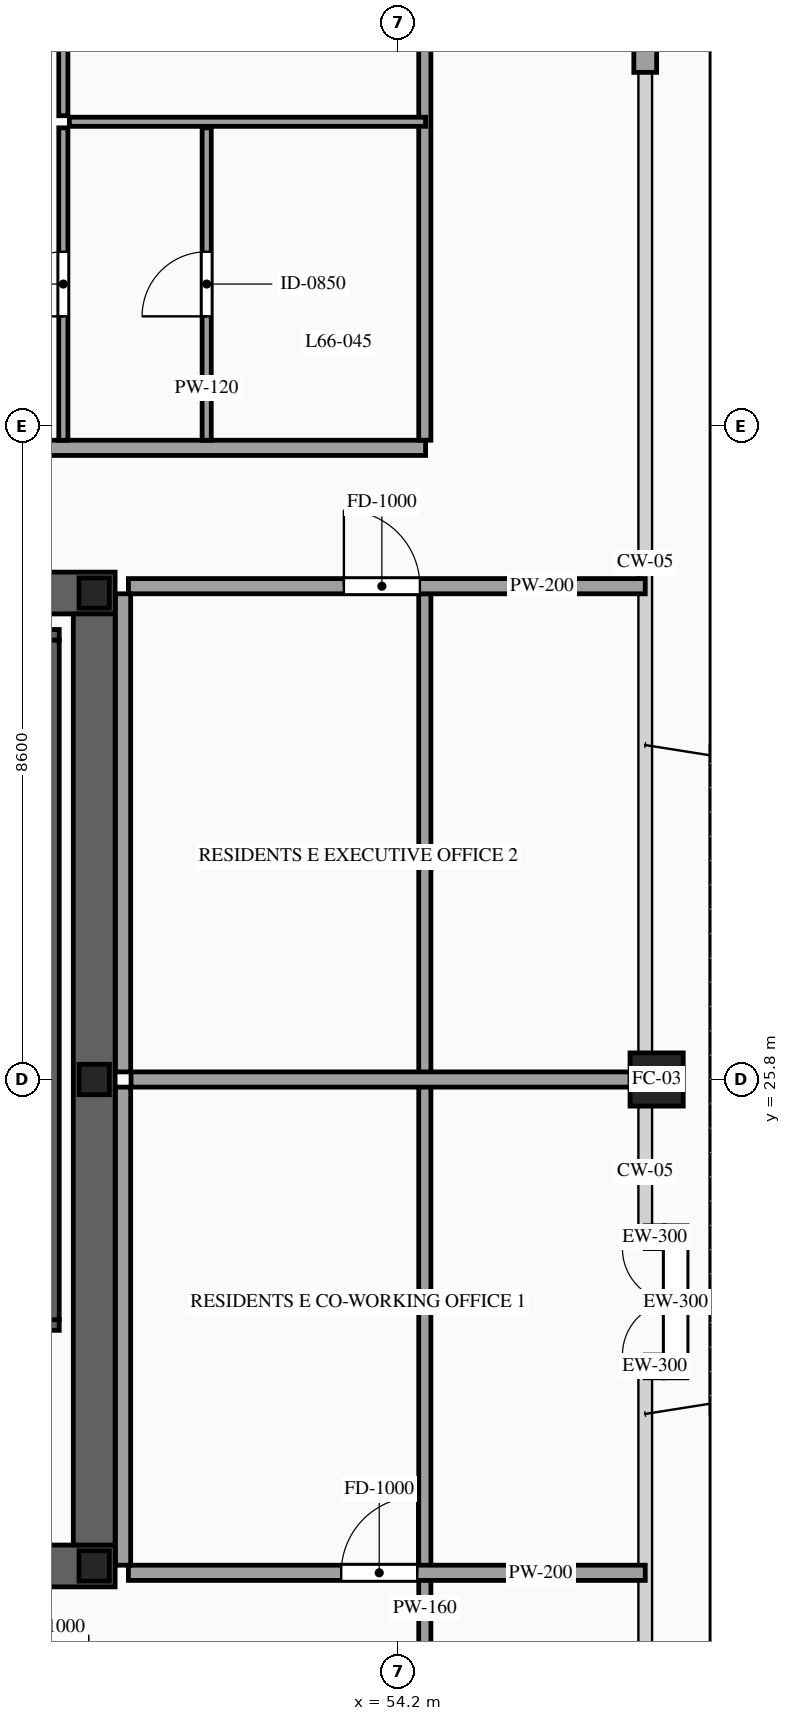
"""IFC4 building model, lengths in metres.
Left out: names, types, materials, properties, quantities, classifications, styles, units other than length and angle.
Written with IfcOpenShell. Run it as: python <this file> out.ifc"""

import sys

from ifc_helpers import new_model, si_unit, direction, frame, frame_2d, origin, origin_2d, place, context, subcontext, project, spatial, rectangle, hollow_rectangle, i_section, extrude, source, transform, mapped, element, fill, save


model = new_model("IFC4")
c1 = context("Model", 3, precision=1e-05, world=origin(), true_north=direction((0.0, 1.0)))
c2 = subcontext(c1, "Body", "Model", "MODEL_VIEW")
j1 = project(units=[si_unit("LENGTHUNIT", "METRE"), si_unit("PLANEANGLEUNIT", "RADIAN")], contexts=[c1])
p1 = place(None, origin())
s1 = spatial("IfcSite", under=j1, at=p1, CompositionType="ELEMENT")
p2 = place(p1, origin())
s2 = spatial("IfcBuilding", under=s1, at=p2, CompositionType="ELEMENT")
p3 = place(p2, frame((0.0, 0.0, 248.6)))
s3 = spatial("IfcBuildingStorey", under=s2, at=p3, CompositionType="ELEMENT", Elevation=248.6)
p4 = place(p3, frame((23.525, 19.4, 0.0), z_axis=(0.0, 0.0, 1.0), x_axis=(1.0, 0.0, 0.0)))
e1 = element("IfcWall", 1, at=p4, inside=s3, PredefinedType="SHEAR", context=c2, shape_type="SweptSolid", body=[
    extrude(rectangle(XDim=26.95, YDim=0.55, at=frame_2d((13.475, 0.0))), origin(), (0.0, 0.0, 1.0), 3.5),
])
p5 = place(p4, frame((1.925, 0.0, 0.0)))
e2 = element("IfcOpeningElement", 2, at=p5, cuts=e1, PredefinedType="OPENING", context=c2, shape_type="SweptSolid", body=[
    extrude(rectangle(XDim=1.1, YDim=2.2, at=frame_2d((0.55, 1.1))), frame((0.0, 0.29, 0.0), z_axis=(0.0, -1.0, 0.0), x_axis=(1.0, 0.0, 0.0)), (0.0, 0.0, 1.0), 0.58),
])
p6 = place(p4, frame((9.825, 0.0, 0.0)))
e3 = element("IfcOpeningElement", 3, at=p6, cuts=e1, PredefinedType="OPENING", context=c2, shape_type="SweptSolid", body=[
    extrude(rectangle(XDim=1.1, YDim=2.2, at=frame_2d((0.55, 1.1))), frame((0.0, 0.29, 0.0), z_axis=(0.0, -1.0, 0.0), x_axis=(1.0, 0.0, 0.0)), (0.0, 0.0, 1.0), 0.58),
])
p7 = place(p4, frame((23.025, 0.0, 0.0)))
e4 = element("IfcOpeningElement", 4, at=p7, cuts=e1, PredefinedType="OPENING", context=c2, shape_type="SweptSolid", body=[
    extrude(rectangle(XDim=1.1, YDim=2.2, at=frame_2d((0.55, 1.1))), frame((0.0, 0.29, 0.0), z_axis=(0.0, -1.0, 0.0), x_axis=(1.0, 0.0, 0.0)), (0.0, 0.0, 1.0), 0.58),
])
p8 = place(p4, frame((19.645, 0.0, 0.0)))
e5 = element("IfcOpeningElement", 5, at=p8, cuts=e1, PredefinedType="OPENING", context=c2, shape_type="SweptSolid", body=[
    extrude(rectangle(XDim=0.9, YDim=2.15, at=frame_2d((0.45, 1.075))), frame((0.0, 0.29, 0.0), z_axis=(0.0, -1.0, 0.0), x_axis=(1.0, 0.0, 0.0)), (0.0, 0.0, 1.0), 0.58),
])
p9 = place(p4, frame((18.205, 0.0, 0.0)))
e6 = element("IfcOpeningElement", 6, at=p9, cuts=e1, PredefinedType="OPENING", context=c2, shape_type="SweptSolid", body=[
    extrude(rectangle(XDim=0.9, YDim=2.15, at=frame_2d((0.45, 1.075))), frame((0.0, 0.29, 0.0), z_axis=(0.0, -1.0, 0.0), x_axis=(1.0, 0.0, 0.0)), (0.0, 0.0, 1.0), 0.58),
])
p10 = place(p3, frame((23.525, 32.2, 0.0), z_axis=(0.0, 0.0, 1.0), x_axis=(1.0, 0.0, 0.0)))
e7 = element("IfcWall", 7, at=p10, inside=s3, PredefinedType="SHEAR", context=c2, shape_type="SweptSolid", body=[
    extrude(rectangle(XDim=26.95, YDim=0.55, at=frame_2d((13.475, 0.0))), origin(), (0.0, 0.0, 1.0), 3.5),
])
p11 = place(p10, frame((4.545, 0.0, 0.0)))
e8 = element("IfcOpeningElement", 8, at=p11, cuts=e7, PredefinedType="OPENING", context=c2, shape_type="SweptSolid", body=[
    extrude(rectangle(XDim=0.9, YDim=2.15, at=frame_2d((0.45, 1.075))), frame((0.0, 0.29, 0.0), z_axis=(0.0, -1.0, 0.0), x_axis=(1.0, 0.0, 0.0)), (0.0, 0.0, 1.0), 0.58),
])
p12 = place(p10, frame((9.825, 0.0, 0.0)))
e9 = element("IfcOpeningElement", 9, at=p12, cuts=e7, PredefinedType="OPENING", context=c2, shape_type="SweptSolid", body=[
    extrude(rectangle(XDim=1.1, YDim=2.2, at=frame_2d((0.55, 1.1))), frame((0.0, 0.29, 0.0), z_axis=(0.0, -1.0, 0.0), x_axis=(1.0, 0.0, 0.0)), (0.0, 0.0, 1.0), 0.58),
])
p13 = place(p10, frame((15.675, 0.0, 0.0)))
e10 = element("IfcOpeningElement", 10, at=p13, cuts=e7, PredefinedType="OPENING", context=c2, shape_type="SweptSolid", body=[
    extrude(rectangle(XDim=1.1, YDim=2.2, at=frame_2d((0.55, 1.1))), frame((0.0, 0.29, 0.0), z_axis=(0.0, -1.0, 0.0), x_axis=(1.0, 0.0, 0.0)), (0.0, 0.0, 1.0), 0.58),
])
m1 = source(origin(), c2, "Body", "SweptSolid", [
    extrude(rectangle(XDim=12.25, YDim=0.55, at=frame_2d((6.125, 0.0))), origin(), (0.0, 0.0, 1.0), 3.5),
])
p14 = place(p3, frame((50.2, 19.675, 0.0), z_axis=(0.0, 0.0, 1.0), x_axis=(0.0, 1.0, 0.0)))
e11 = element("IfcWall", 11, at=p14, inside=s3, PredefinedType="SHEAR", context=c2, shape_type="MappedRepresentation", body=[
    mapped(m1, transform((0.0, 0.0, 0.0), scale=1.0)),
])
m2 = source(origin(), c2, "Body", "SweptSolid", [
    extrude(i_section(OverallWidth=0.4, OverallDepth=0.4, WebThickness=0.013, FlangeThickness=0.021, at=origin_2d()), origin(), (0.0, 0.0, 1.0), 3.5),
])
for number, where, z_axis, x_axis in (
    (12, (50.2, 19.4, 0.0), (0.0, 0.0, 1.0), (1.0, 0.0, 0.0)),
    (13, (50.2, 25.8, 0.0), (0.0, 0.0, 1.0), (1.0, 0.0, 0.0)),
    (14, (50.2, 32.2, 0.0), (0.0, 0.0, 1.0), (1.0, 0.0, 0.0)),
):
    element("IfcColumn", number, at=place(p3, frame(where, z_axis=z_axis, x_axis=x_axis)), inside=s3, PredefinedType="COLUMN", context=c2, shape_type="MappedRepresentation", body=[
        mapped(m2, transform((0.0, 0.0, 0.0), scale=1.0)),
    ])
m3 = source(origin(), c2, "Body", "SweptSolid", [
    extrude(hollow_rectangle(XDim=0.7, YDim=0.7, WallThickness=0.032, at=origin_2d()), origin(), (0.0, 0.0, 1.0), 3.5),
])
p15 = place(p3, frame((57.6, 25.8, 0.0), z_axis=(0.0, 0.0, 1.0), x_axis=(1.0, 0.0, 0.0)))
e15 = element("IfcColumn", 15, at=p15, inside=s3, PredefinedType="COLUMN", context=c2, shape_type="MappedRepresentation", body=[
    mapped(m3, transform((0.0, 0.0, 0.0), scale=1.0)),
])
m4 = source(origin(), c2, "Body", "SweptSolid", [
    extrude(rectangle(XDim=3.15, YDim=0.3, at=frame_2d((1.575, 0.0))), origin(), (0.0, 0.0, 1.0), 2.835),
])
p16 = place(p3, frame((57.45, 39.05, 0.0), z_axis=(0.0, 0.0, 1.0), x_axis=(0.0, 1.0, 0.0)))
e16 = element("IfcWall", 16, at=p16, inside=s3, PredefinedType="SOLIDWALL", context=c2, shape_type="MappedRepresentation", body=[
    mapped(m4, transform((0.0, 0.0, 0.0), scale=1.0)),
])
p17 = place(p3, frame((57.85, 21.875, 0.0), z_axis=(0.0, 0.0, 1.0), x_axis=(0.0, 1.0, 0.0)))
e17 = element("IfcWall", 17, at=p17, inside=s3, PredefinedType="SOLIDWALL", context=c2, shape_type="SweptSolid", body=[
    extrude(rectangle(XDim=2.0, YDim=0.3, at=frame_2d((1.0, 0.0))), origin(), (0.0, 0.0, 1.0), 2.835),
])
p18 = place(p17, frame((0.3, 0.0, 0.0)))
e18 = element("IfcOpeningElement", 18, at=p18, cuts=e17, PredefinedType="OPENING", context=c2, shape_type="SweptSolid", body=[
    extrude(rectangle(XDim=1.4, YDim=2.3, at=frame_2d((0.7, 1.15))), frame((0.0, 0.165, 0.0), z_axis=(0.0, -1.0, 0.0), x_axis=(1.0, 0.0, 0.0)), (0.0, 0.0, 1.0), 0.33),
])
m5 = source(origin(), c2, "Body", "SweptSolid", [
    extrude(rectangle(XDim=0.25, YDim=0.3, at=frame_2d((0.125, 0.0))), origin(), (0.0, 0.0, 1.0), 3.28),
])
for number, where, z_axis, x_axis in (
    (19, (57.45, 22.025, 0.0), (0.0, 0.0, 1.0), (1.0, 0.0, 0.0)),
    (20, (57.7, 23.725, 0.0), (0.0, 0.0, 1.0), (-1.0, 0.0, 0.0)),
):
    element("IfcWall", number, at=place(p3, frame(where, z_axis=z_axis, x_axis=x_axis)), inside=s3, PredefinedType="SOLIDWALL", context=c2, shape_type="MappedRepresentation", body=[
        mapped(m5, transform((0.0, 0.0, 0.0), scale=1.0)),
    ])
p19 = place(p3, frame((46.46, 22.57, 0.0), z_axis=(0.0, 0.0, 1.0), x_axis=(1.0, 0.0, 0.0)))
e21 = element("IfcWall", 21, at=p19, inside=s3, PredefinedType="SOLIDWALL", context=c2, shape_type="SweptSolid", body=[
    extrude(rectangle(XDim=3.28, YDim=0.14, at=frame_2d((1.64, 0.0))), origin(), (0.0, 0.0, 1.0), 3.28),
])
p20 = place(p19, frame((1.09, 0.0, 0.0)))
e22 = element("IfcOpeningElement", 22, at=p20, cuts=e21, PredefinedType="OPENING", context=c2, shape_type="SweptSolid", body=[
    extrude(rectangle(XDim=1.1, YDim=2.2, at=frame_2d((0.55, 1.1))), frame((0.0, 0.085, 0.0), z_axis=(0.0, -1.0, 0.0), x_axis=(1.0, 0.0, 0.0)), (0.0, 0.0, 1.0), 0.17),
])
m6 = source(origin(), c2, "Body", "SweptSolid", [
    extrude(rectangle(XDim=3.28, YDim=0.14, at=frame_2d((1.64, 0.0))), origin(), (0.0, 0.0, 1.0), 3.28),
])
p21 = place(p3, frame((46.46, 31.65, 0.0), z_axis=(0.0, 0.0, 1.0), x_axis=(1.0, 0.0, 0.0)))
e23 = element("IfcWall", 23, at=p21, inside=s3, PredefinedType="SOLIDWALL", context=c2, shape_type="MappedRepresentation", body=[
    mapped(m6, transform((0.0, 0.0, 0.0), scale=1.0)),
])
m7 = source(origin(), c2, "Body", "SweptSolid", [
    extrude(rectangle(XDim=8.94, YDim=0.14, at=frame_2d((4.47, 0.0))), origin(), (0.0, 0.0, 1.0), 3.28),
])
p22 = place(p3, frame((49.67, 22.64, 0.0), z_axis=(0.0, 0.0, 1.0), x_axis=(0.0, 1.0, 0.0)))
e24 = element("IfcWall", 24, at=p22, inside=s3, PredefinedType="SOLIDWALL", context=c2, shape_type="MappedRepresentation", body=[
    mapped(m7, transform((0.0, 0.0, 0.0), scale=1.0)),
])
p23 = place(p3, frame((43.402, 34.11, 0.0), z_axis=(0.0, 0.0, 1.0), x_axis=(1.0, 0.0, 0.0)))
e25 = element("IfcWall", 25, at=p23, inside=s3, PredefinedType="PARTITIONING", context=c2, shape_type="SweptSolid", body=[
    extrude(rectangle(XDim=11.158, YDim=0.2, at=frame_2d((5.579, 0.0))), origin(), (0.0, 0.0, 1.0), 3.28),
])
p24 = place(p23, frame((4.409, 0.0, 0.0)))
e26 = element("IfcOpeningElement", 26, at=p24, cuts=e25, PredefinedType="OPENING", context=c2, shape_type="SweptSolid", body=[
    extrude(rectangle(XDim=1.0, YDim=2.2, at=frame_2d((0.5, 1.1))), frame((0.0, 0.115, 0.0), z_axis=(0.0, -1.0, 0.0), x_axis=(1.0, 0.0, 0.0)), (0.0, 0.0, 1.0), 0.23),
])
m8 = source(origin(), c2, "Body", "SweptSolid", [
    extrude(rectangle(XDim=11.89, YDim=0.16, at=frame_2d((5.945, 0.0))), origin(), (0.0, 0.0, 1.0), 3.28),
])
p25 = place(p3, frame((54.55, 34.21, 0.0), z_axis=(0.0, 0.0, 1.0), x_axis=(0.0, 1.0, 0.0)))
e27 = element("IfcWall", 27, at=p25, inside=s3, PredefinedType="PARTITIONING", context=c2, shape_type="MappedRepresentation", body=[
    mapped(m8, transform((0.0, 0.0, 0.0), scale=1.0)),
])
p26 = place(p3, frame((51.68, 34.21, 0.0), z_axis=(0.0, 0.0, 1.0), x_axis=(0.0, 1.0, 0.0)))
e28 = element("IfcWall", 28, at=p26, inside=s3, PredefinedType="PARTITIONING", context=c2, shape_type="SweptSolid", body=[
    extrude(rectangle(XDim=4.11, YDim=0.12, at=frame_2d((2.055, 0.0))), origin(), (0.0, 0.0, 1.0), 3.28),
])
p27 = place(p26, frame((1.63, 0.0, 0.0)))
e29 = element("IfcOpeningElement", 29, at=p27, cuts=e28, PredefinedType="OPENING", context=c2, shape_type="SweptSolid", body=[
    extrude(rectangle(XDim=0.85, YDim=2.1, at=frame_2d((0.425, 1.05))), frame((0.0, 0.075, 0.0), z_axis=(0.0, -1.0, 0.0), x_axis=(1.0, 0.0, 0.0)), (0.0, 0.0, 1.0), 0.15),
])
m9 = source(origin(), c2, "Body", "SweptSolid", [
    extrude(rectangle(XDim=4.686, YDim=0.12, at=frame_2d((2.343, 0.0))), origin(), (0.0, 0.0, 1.0), 3.28),
])
p28 = place(p3, frame((49.874, 38.4, 0.0), z_axis=(0.0, 0.0, 1.0), x_axis=(1.0, 0.0, 0.0)))
e30 = element("IfcWall", 30, at=p28, inside=s3, PredefinedType="PARTITIONING", context=c2, shape_type="MappedRepresentation", body=[
    mapped(m9, transform((0.0, 0.0, 0.0), scale=1.0)),
])
p29 = place(p3, frame((49.794, 38.48, 0.0), z_axis=(0.0, 0.0, 1.0), x_axis=(0.0, 1.0, 0.0)))
e31 = element("IfcWall", 31, at=p29, inside=s3, PredefinedType="PARTITIONING", context=c2, shape_type="SweptSolid", body=[
    extrude(rectangle(XDim=7.77, YDim=0.12, at=frame_2d((3.885, 0.0))), origin(), (0.0, 0.0, 1.0), 3.28),
])
p30 = place(p29, frame((3.435, 0.0, 0.0)))
e32 = element("IfcOpeningElement", 32, at=p30, cuts=e31, PredefinedType="OPENING", context=c2, shape_type="SweptSolid", body=[
    extrude(rectangle(XDim=0.9, YDim=2.15, at=frame_2d((0.45, 1.075))), frame((0.0, 0.075, 0.0), z_axis=(0.0, -1.0, 0.0), x_axis=(1.0, 0.0, 0.0)), (0.0, 0.0, 1.0), 0.15),
])
p31 = place(p3, frame((49.794, 34.21, 0.0), z_axis=(0.0, 0.0, 1.0), x_axis=(0.0, 1.0, 0.0)))
e33 = element("IfcWall", 33, at=p31, inside=s3, PredefinedType="PARTITIONING", context=c2, shape_type="SweptSolid", body=[
    extrude(rectangle(XDim=4.11, YDim=0.12, at=frame_2d((2.055, 0.0))), origin(), (0.0, 0.0, 1.0), 3.28),
])
p32 = place(p31, frame((1.63, 0.0, 0.0)))
e34 = element("IfcOpeningElement", 34, at=p32, cuts=e33, PredefinedType="OPENING", context=c2, shape_type="SweptSolid", body=[
    extrude(rectangle(XDim=0.85, YDim=2.1, at=frame_2d((0.425, 1.05))), frame((0.0, 0.075, 0.0), z_axis=(0.0, -1.0, 0.0), x_axis=(1.0, 0.0, 0.0)), (0.0, 0.0, 1.0), 0.15),
])
m10 = source(origin(), c2, "Body", "SweptSolid", [
    extrude(rectangle(XDim=26.69, YDim=0.16, at=frame_2d((13.345, 0.0))), origin(), (0.0, 0.0, 1.0), 3.28),
])
p33 = place(p3, frame((54.55, 5.5, 0.0), z_axis=(0.0, 0.0, 1.0), x_axis=(0.0, 1.0, 0.0)))
e35 = element("IfcWall", 35, at=p33, inside=s3, PredefinedType="PARTITIONING", context=c2, shape_type="MappedRepresentation", body=[
    mapped(m10, transform((0.0, 0.0, 0.0), scale=1.0)),
])
p34 = place(p3, frame((50.65, 19.31, 0.0), z_axis=(0.0, 0.0, 1.0), x_axis=(1.0, 0.0, 0.0)))
e36 = element("IfcWall", 36, at=p34, inside=s3, PredefinedType="PARTITIONING", context=c2, shape_type="SweptSolid", body=[
    extrude(rectangle(XDim=6.8, YDim=0.2, at=frame_2d((3.4, 0.0))), origin(), (0.0, 0.0, 1.0), 2.825),
])
p35 = place(p34, frame((2.8, 0.0, 0.0)))
e37 = element("IfcOpeningElement", 37, at=p35, cuts=e36, PredefinedType="OPENING", context=c2, shape_type="SweptSolid", body=[
    extrude(rectangle(XDim=1.0, YDim=2.2, at=frame_2d((0.5, 1.1))), frame((0.0, 0.115, 0.0), z_axis=(0.0, -1.0, 0.0), x_axis=(1.0, 0.0, 0.0)), (0.0, 0.0, 1.0), 0.23),
])
m11 = source(origin(), c2, "Body", "SweptSolid", [
    extrude(rectangle(XDim=6.765, YDim=0.2, at=frame_2d((3.382, 0.0))), origin(), (0.0, 0.0, 1.0), 2.787),
])
p36 = place(p3, frame((50.685, 25.8, 0.0), z_axis=(0.0, 0.0, 1.0), x_axis=(1.0, 0.0, 0.0)))
e38 = element("IfcWall", 38, at=p36, inside=s3, PredefinedType="PARTITIONING", context=c2, shape_type="MappedRepresentation", body=[
    mapped(m11, transform((0.0, 0.0, 0.0), scale=1.0)),
])
m12 = source(origin(), c2, "Body", "SweptSolid", [
    extrude(rectangle(XDim=6.29, YDim=0.2, at=frame_2d((3.145, 0.0))), origin(), (0.0, 0.0, 1.0), 3.28),
])
p37 = place(p3, frame((50.58, 19.41, 0.0), z_axis=(0.0, 0.0, 1.0), x_axis=(0.0, 1.0, 0.0)))
e39 = element("IfcWall", 39, at=p37, inside=s3, PredefinedType="PARTITIONING", context=c2, shape_type="MappedRepresentation", body=[
    mapped(m12, transform((0.0, 0.0, 0.0), scale=1.0)),
])
p38 = place(p3, frame((50.65, 32.29, 0.0), z_axis=(0.0, 0.0, 1.0), x_axis=(1.0, 0.0, 0.0)))
e40 = element("IfcWall", 40, at=p38, inside=s3, PredefinedType="PARTITIONING", context=c2, shape_type="SweptSolid", body=[
    extrude(rectangle(XDim=6.8, YDim=0.2, at=frame_2d((3.4, 0.0))), origin(), (0.0, 0.0, 1.0), 2.825),
])
p39 = place(p38, frame((2.835, 0.0, 0.0)))
e41 = element("IfcOpeningElement", 41, at=p39, cuts=e40, PredefinedType="OPENING", context=c2, shape_type="SweptSolid", body=[
    extrude(rectangle(XDim=1.0, YDim=2.2, at=frame_2d((0.5, 1.1))), frame((0.0, 0.115, 0.0), z_axis=(0.0, -1.0, 0.0), x_axis=(1.0, 0.0, 0.0)), (0.0, 0.0, 1.0), 0.23),
])
p40 = place(p3, frame((50.58, 25.9, 0.0), z_axis=(0.0, 0.0, 1.0), x_axis=(0.0, 1.0, 0.0)))
e42 = element("IfcWall", 42, at=p40, inside=s3, PredefinedType="PARTITIONING", context=c2, shape_type="MappedRepresentation", body=[
    mapped(m12, transform((0.0, 0.0, 0.0), scale=1.0)),
])
m13 = source(origin(), c2, "Body", "SweptSolid", [
    extrude(rectangle(XDim=1.4, YDim=2.3, at=frame_2d((0.7, 1.15))), frame((0.0, 0.025, 0.0), z_axis=(0.0, -1.0, 0.0), x_axis=(1.0, 0.0, 0.0)), (0.0, 0.0, 1.0), 0.05),
])
p41 = place(p18, origin())
e43 = element("IfcDoor", 43, at=p41, inside=s3, OperationType="DOUBLE_DOOR_SINGLE_SWING", PredefinedType="DOOR", context=c2, shape_type="MappedRepresentation", body=[
    mapped(m13, transform((0.0, 0.0, 0.0), scale=1.0)),
])
fill(e18, e43)
m14 = source(origin(), c2, "Body", "SweptSolid", [
    extrude(rectangle(XDim=0.85, YDim=2.1, at=frame_2d((0.425, 1.05))), frame((0.0, 0.025, 0.0), z_axis=(0.0, -1.0, 0.0), x_axis=(1.0, 0.0, 0.0)), (0.0, 0.0, 1.0), 0.05),
])
p42 = place(p27, origin())
e44 = element("IfcDoor", 44, at=p42, inside=s3, OperationType="SINGLE_SWING_LEFT", PredefinedType="DOOR", context=c2, shape_type="MappedRepresentation", body=[
    mapped(m14, transform((0.0, 0.0, 0.0), scale=1.0)),
])
fill(e29, e44)
p43 = place(p32, origin())
e45 = element("IfcDoor", 45, at=p43, inside=s3, OperationType="SINGLE_SWING_LEFT", PredefinedType="DOOR", context=c2, shape_type="MappedRepresentation", body=[
    mapped(m14, transform((0.0, 0.0, 0.0), scale=1.0)),
])
fill(e34, e45)
m15 = source(origin(), c2, "Body", "SweptSolid", [
    extrude(rectangle(XDim=1.0, YDim=2.2, at=frame_2d((0.5, 1.1))), frame((0.0, 0.025, 0.0), z_axis=(0.0, -1.0, 0.0), x_axis=(1.0, 0.0, 0.0)), (0.0, 0.0, 1.0), 0.05),
])
p44 = place(p35, origin())
e46 = element("IfcDoor", 46, at=p44, inside=s3, OperationType="SINGLE_SWING_RIGHT", PredefinedType="DOOR", context=c2, shape_type="MappedRepresentation", body=[
    mapped(m15, transform((0.0, 0.0, 0.0), scale=1.0)),
])
fill(e37, e46)
p45 = place(p39, origin())
e47 = element("IfcDoor", 47, at=p45, inside=s3, OperationType="SINGLE_SWING_LEFT", PredefinedType="DOOR", context=c2, shape_type="MappedRepresentation", body=[
    mapped(m15, transform((0.0, 0.0, 0.0), scale=1.0)),
])
fill(e41, e47)
save(model, sys.argv[1])
